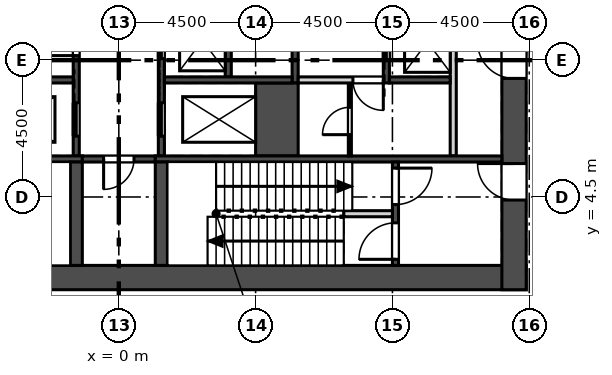
"""IFC4 building model, lengths in metres.
Left out: names, types, materials, properties, quantities, classifications, styles, units other than length and angle.
Written with IfcOpenShell. Run it as: python <this file> out.ifc"""

import sys

from ifc_helpers import new_model, si_unit, direction, frame, frame_2d, origin, place, context, subcontext, project, spatial, rectangle, extrude, element, fill, save


model = new_model("IFC4")
c1 = context("Model", 3, precision=1e-05, world=origin(), true_north=direction((0.0, 1.0)))
c2 = subcontext(c1, "Body", "Model", "MODEL_VIEW")
j1 = project(units=[si_unit("LENGTHUNIT", "METRE"), si_unit("PLANEANGLEUNIT", "RADIAN")], contexts=[c1])
p1 = place(None, origin())
s1 = spatial("IfcSite", under=j1, at=p1, CompositionType="ELEMENT")
p2 = place(p1, origin())
s2 = spatial("IfcBuilding", under=s1, at=p2, CompositionType="ELEMENT")
p3 = place(p2, frame((0.0, 0.0, 304.5)))
s3 = spatial("IfcBuildingStorey", under=s2, at=p3, CompositionType="ELEMENT", Elevation=304.5)
p4 = place(p3, frame((-13.4, 1.85, 0.0), z_axis=(0.0, 0.0, 1.0), x_axis=(1.0, 0.0, 0.0)))
e1 = element("IfcWall", 1, at=p4, inside=s3, PredefinedType="SHEAR", context=c2, shape_type="SweptSolid", body=[
    extrude(rectangle(XDim=26.8, YDim=0.8, at=frame_2d((13.4, 0.0))), origin(), (0.0, 0.0, 1.0), 5.4),
])
p5 = place(p3, frame((13.0, 1.45, 0.0), z_axis=(0.0, 0.0, 1.0), x_axis=(0.0, 1.0, 0.0)))
e2 = element("IfcWall", 2, at=p5, inside=s3, PredefinedType="SHEAR", context=c2, shape_type="SweptSolid", body=[
    extrude(rectangle(XDim=9.442, YDim=0.8, at=frame_2d((4.721, 0.0))), origin(), (0.0, 0.0, 1.0), 5.4),
])
p6 = place(p5, frame((2.95, 0.0, 0.0)))
e3 = element("IfcOpeningElement", 3, at=p6, cuts=e2, PredefinedType="OPENING", context=c2, shape_type="SweptSolid", body=[
    extrude(rectangle(XDim=1.2, YDim=2.1, at=frame_2d((0.6, 1.05))), frame((0.0, 0.41, 0.0), z_axis=(0.0, -1.0, 0.0), x_axis=(1.0, 0.0, 0.0)), (0.0, 0.0, 1.0), 0.82),
])
p7 = place(p5, frame((6.95, 0.0, 0.0)))
e4 = element("IfcOpeningElement", 4, at=p7, cuts=e2, PredefinedType="OPENING", context=c2, shape_type="SweptSolid", body=[
    extrude(rectangle(XDim=1.2, YDim=2.1, at=frame_2d((0.6, 1.05))), frame((0.0, 0.41, 0.0), z_axis=(0.0, -1.0, 0.0), x_axis=(1.0, 0.0, 0.0)), (0.0, 0.0, 1.0), 0.82),
])
p8 = place(p3, frame((24.905, 7.709, 0.0), z_axis=(0.0, 0.0, 1.0), x_axis=(-0.50000128873, 0.866024659735, 0.0)))
e5 = element("IfcWall", 5, at=p8, inside=s3, PredefinedType="SOLIDWALL", context=c2, shape_type="SweptSolid", body=[
    extrude(rectangle(XDim=41.104, YDim=0.34, at=frame_2d((20.552, 0.0))), origin(), (0.0, 0.0, 1.0), 5.0),
])
p9 = place(p8, frame((3.776, 0.0, 0.9)))
e6 = element("IfcOpeningElement", 6, at=p9, cuts=e5, PredefinedType="OPENING", context=c2, shape_type="SweptSolid", body=[
    extrude(rectangle(XDim=1.885, YDim=3.0, at=frame_2d((0.942, 1.5))), frame((0.0, 0.18, 0.0), z_axis=(0.0, -1.0, 0.0), x_axis=(1.0, 0.0, 0.0)), (0.0, 0.0, 1.0), 0.36),
])
p10 = place(p8, frame((6.776, 0.0, 0.9)))
e7 = element("IfcOpeningElement", 7, at=p10, cuts=e5, PredefinedType="OPENING", context=c2, shape_type="SweptSolid", body=[
    extrude(rectangle(XDim=1.885, YDim=3.0, at=frame_2d((0.942, 1.5))), frame((0.0, 0.18, 0.0), z_axis=(0.0, -1.0, 0.0), x_axis=(1.0, 0.0, 0.0)), (0.0, 0.0, 1.0), 0.36),
])
p11 = place(p8, frame((9.776, 0.0, 0.9)))
e8 = element("IfcOpeningElement", 8, at=p11, cuts=e5, PredefinedType="OPENING", context=c2, shape_type="SweptSolid", body=[
    extrude(rectangle(XDim=1.885, YDim=3.0, at=frame_2d((0.942, 1.5))), frame((0.0, 0.18, 0.0), z_axis=(0.0, -1.0, 0.0), x_axis=(1.0, 0.0, 0.0)), (0.0, 0.0, 1.0), 0.36),
])
p12 = place(p8, frame((12.776, 0.0, 0.9)))
e9 = element("IfcOpeningElement", 9, at=p12, cuts=e5, PredefinedType="OPENING", context=c2, shape_type="SweptSolid", body=[
    extrude(rectangle(XDim=1.885, YDim=3.0, at=frame_2d((0.942, 1.5))), frame((0.0, 0.18, 0.0), z_axis=(0.0, -1.0, 0.0), x_axis=(1.0, 0.0, 0.0)), (0.0, 0.0, 1.0), 0.36),
])
p13 = place(p8, frame((15.776, 0.0, 0.9)))
e10 = element("IfcOpeningElement", 10, at=p13, cuts=e5, PredefinedType="OPENING", context=c2, shape_type="SweptSolid", body=[
    extrude(rectangle(XDim=1.885, YDim=3.0, at=frame_2d((0.942, 1.5))), frame((0.0, 0.18, 0.0), z_axis=(0.0, -1.0, 0.0), x_axis=(1.0, 0.0, 0.0)), (0.0, 0.0, 1.0), 0.36),
])
p14 = place(p8, frame((18.776, 0.0, 0.9)))
e11 = element("IfcOpeningElement", 11, at=p14, cuts=e5, PredefinedType="OPENING", context=c2, shape_type="SweptSolid", body=[
    extrude(rectangle(XDim=1.885, YDim=3.0, at=frame_2d((0.942, 1.5))), frame((0.0, 0.18, 0.0), z_axis=(0.0, -1.0, 0.0), x_axis=(1.0, 0.0, 0.0)), (0.0, 0.0, 1.0), 0.36),
])
p15 = place(p8, frame((21.776, 0.0, 0.9)))
e12 = element("IfcOpeningElement", 12, at=p15, cuts=e5, PredefinedType="OPENING", context=c2, shape_type="SweptSolid", body=[
    extrude(rectangle(XDim=1.885, YDim=3.0, at=frame_2d((0.942, 1.5))), frame((0.0, 0.18, 0.0), z_axis=(0.0, -1.0, 0.0), x_axis=(1.0, 0.0, 0.0)), (0.0, 0.0, 1.0), 0.36),
])
p16 = place(p8, frame((24.776, 0.0, 0.9)))
e13 = element("IfcOpeningElement", 13, at=p16, cuts=e5, PredefinedType="OPENING", context=c2, shape_type="SweptSolid", body=[
    extrude(rectangle(XDim=1.885, YDim=3.0, at=frame_2d((0.942, 1.5))), frame((0.0, 0.18, 0.0), z_axis=(0.0, -1.0, 0.0), x_axis=(1.0, 0.0, 0.0)), (0.0, 0.0, 1.0), 0.36),
])
p17 = place(p8, frame((27.776, 0.0, 0.9)))
e14 = element("IfcOpeningElement", 14, at=p17, cuts=e5, PredefinedType="OPENING", context=c2, shape_type="SweptSolid", body=[
    extrude(rectangle(XDim=1.885, YDim=3.0, at=frame_2d((0.942, 1.5))), frame((0.0, 0.18, 0.0), z_axis=(0.0, -1.0, 0.0), x_axis=(1.0, 0.0, 0.0)), (0.0, 0.0, 1.0), 0.36),
])
p18 = place(p8, frame((30.776, 0.0, 0.9)))
e15 = element("IfcOpeningElement", 15, at=p18, cuts=e5, PredefinedType="OPENING", context=c2, shape_type="SweptSolid", body=[
    extrude(rectangle(XDim=1.885, YDim=3.0, at=frame_2d((0.942, 1.5))), frame((0.0, 0.18, 0.0), z_axis=(0.0, -1.0, 0.0), x_axis=(1.0, 0.0, 0.0)), (0.0, 0.0, 1.0), 0.36),
])
p19 = place(p8, frame((33.776, 0.0, 0.9)))
e16 = element("IfcOpeningElement", 16, at=p19, cuts=e5, PredefinedType="OPENING", context=c2, shape_type="SweptSolid", body=[
    extrude(rectangle(XDim=1.885, YDim=3.0, at=frame_2d((0.942, 1.5))), frame((0.0, 0.18, 0.0), z_axis=(0.0, -1.0, 0.0), x_axis=(1.0, 0.0, 0.0)), (0.0, 0.0, 1.0), 0.36),
])
p20 = place(p8, frame((36.776, 0.0, 0.9)))
e17 = element("IfcOpeningElement", 17, at=p20, cuts=e5, PredefinedType="OPENING", context=c2, shape_type="SweptSolid", body=[
    extrude(rectangle(XDim=1.885, YDim=3.0, at=frame_2d((0.942, 1.5))), frame((0.0, 0.18, 0.0), z_axis=(0.0, -1.0, 0.0), x_axis=(1.0, 0.0, 0.0)), (0.0, 0.0, 1.0), 0.36),
])
p21 = place(p3, frame((11.0, 5.85, 0.0), z_axis=(0.0, 0.0, 1.0), x_axis=(0.0, 1.0, 0.0)))
e18 = element("IfcWall", 18, at=p21, inside=s3, PredefinedType="SOLIDWALL", context=c2, shape_type="SweptSolid", body=[
    extrude(rectangle(XDim=7.4, YDim=0.2, at=frame_2d((3.7, 0.0))), origin(), (0.0, 0.0, 1.0), 5.0),
])
p22 = place(p3, frame((8.8, 8.25, -0.4), z_axis=(0.0, 0.0, 1.0), x_axis=(0.0, 1.0, 0.0)))
e19 = element("IfcWall", 19, at=p22, inside=s3, PredefinedType="SOLIDWALL", context=c2, shape_type="SweptSolid", body=[
    extrude(rectangle(XDim=5.2, YDim=0.2, at=frame_2d((2.6, 0.0))), origin(), (0.0, 0.0, 1.0), 5.4),
])
p23 = place(p22, frame((0.75, 0.0, 0.4)))
e20 = element("IfcOpeningElement", 20, at=p23, cuts=e19, PredefinedType="OPENING", context=c2, shape_type="SweptSolid", body=[
    extrude(rectangle(XDim=1.2, YDim=2.1, at=frame_2d((0.6, 1.05))), frame((0.0, 0.11, 0.0), z_axis=(0.0, -1.0, 0.0), x_axis=(1.0, 0.0, 0.0)), (0.0, 0.0, 1.0), 0.22),
])
p24 = place(p22, frame((3.25, 0.0, 0.4)))
e21 = element("IfcOpeningElement", 21, at=p24, cuts=e19, PredefinedType="OPENING", context=c2, shape_type="SweptSolid", body=[
    extrude(rectangle(XDim=1.2, YDim=2.1, at=frame_2d((0.6, 1.05))), frame((0.0, 0.11, 0.0), z_axis=(0.0, -1.0, 0.0), x_axis=(1.0, 0.0, 0.0)), (0.0, 0.0, 1.0), 0.22),
])
p25 = place(p3, frame((5.8, 8.25, -0.4), z_axis=(0.0, 0.0, 1.0), x_axis=(0.0, 1.0, 0.0)))
e22 = element("IfcWall", 22, at=p25, inside=s3, PredefinedType="SOLIDWALL", context=c2, shape_type="SweptSolid", body=[
    extrude(rectangle(XDim=8.0, YDim=0.2, at=frame_2d((4.0, 0.0))), origin(), (0.0, 0.0, 1.0), 5.4),
])
p26 = place(p25, frame((3.5, 0.0, 0.4)))
e23 = element("IfcOpeningElement", 23, at=p26, cuts=e22, PredefinedType="OPENING", context=c2, shape_type="SweptSolid", body=[
    extrude(rectangle(XDim=1.0, YDim=2.1, at=frame_2d((0.5, 1.05))), frame((0.0, 0.11, 0.0), z_axis=(0.0, -1.0, 0.0), x_axis=(1.0, 0.0, 0.0)), (0.0, 0.0, 1.0), 0.22),
])
p27 = place(p3, frame((3.6, 8.45, -0.4), z_axis=(0.0, 0.0, 1.0), x_axis=(0.0, 1.0, 0.0)))
e24 = element("IfcWall", 24, at=p27, inside=s3, PredefinedType="SOLIDWALL", context=c2, shape_type="SweptSolid", body=[
    extrude(rectangle(XDim=7.8, YDim=0.2, at=frame_2d((3.9, 0.0))), origin(), (0.0, 0.0, 1.0), 5.4),
])
p28 = place(p3, frame((-1.4, 5.85, -0.4), z_axis=(0.0, 0.0, 1.0), x_axis=(0.0, 1.0, 0.0)))
e25 = element("IfcWall", 25, at=p28, inside=s3, PredefinedType="SOLIDWALL", context=c2, shape_type="SweptSolid", body=[
    extrude(rectangle(XDim=11.75, YDim=0.2, at=frame_2d((5.875, 0.0))), origin(), (0.0, 0.0, 1.0), 5.4),
])
p29 = place(p28, frame((0.65, 0.0, 0.4)))
e26 = element("IfcOpeningElement", 26, at=p29, cuts=e25, PredefinedType="OPENING", context=c2, shape_type="SweptSolid", body=[
    extrude(rectangle(XDim=1.1, YDim=2.1, at=frame_2d((0.55, 1.05))), frame((0.0, 0.11, 0.0), z_axis=(0.0, -1.0, 0.0), x_axis=(1.0, 0.0, 0.0)), (0.0, 0.0, 1.0), 0.22),
])
p30 = place(p28, frame((3.3, 0.0, 0.4)))
e27 = element("IfcOpeningElement", 27, at=p30, cuts=e25, PredefinedType="OPENING", context=c2, shape_type="SweptSolid", body=[
    extrude(rectangle(XDim=1.0, YDim=2.1, at=frame_2d((0.5, 1.05))), frame((0.0, 0.11, 0.0), z_axis=(0.0, -1.0, 0.0), x_axis=(1.0, 0.0, 0.0)), (0.0, 0.0, 1.0), 0.22),
])
p31 = place(p28, frame((7.2, 0.0, 0.4)))
e28 = element("IfcOpeningElement", 28, at=p31, cuts=e25, PredefinedType="OPENING", context=c2, shape_type="SweptSolid", body=[
    extrude(rectangle(XDim=1.0, YDim=2.1, at=frame_2d((0.5, 1.05))), frame((0.0, 0.11, 0.0), z_axis=(0.0, -1.0, 0.0), x_axis=(1.0, 0.0, 0.0)), (0.0, 0.0, 1.0), 0.22),
])
p32 = place(p3, frame((1.4, 5.85, -0.4), z_axis=(0.0, 0.0, 1.0), x_axis=(0.0, 1.0, 0.0)))
e29 = element("IfcWall", 29, at=p32, inside=s3, PredefinedType="SOLIDWALL", context=c2, shape_type="SweptSolid", body=[
    extrude(rectangle(XDim=11.75, YDim=0.2, at=frame_2d((5.875, 0.0))), origin(), (0.0, 0.0, 1.0), 5.4),
])
p33 = place(p32, frame((3.2, 0.0, 0.4)))
e30 = element("IfcOpeningElement", 30, at=p33, cuts=e29, PredefinedType="OPENING", context=c2, shape_type="SweptSolid", body=[
    extrude(rectangle(XDim=1.2, YDim=2.1, at=frame_2d((0.6, 1.05))), frame((0.0, 0.11, 0.0), z_axis=(0.0, -1.0, 0.0), x_axis=(1.0, 0.0, 0.0)), (0.0, 0.0, 1.0), 0.22),
])
p34 = place(p32, frame((0.65, 0.0, 0.4)))
e31 = element("IfcOpeningElement", 31, at=p34, cuts=e29, PredefinedType="OPENING", context=c2, shape_type="SweptSolid", body=[
    extrude(rectangle(XDim=1.1, YDim=2.1, at=frame_2d((0.55, 1.05))), frame((0.0, 0.11, 0.0), z_axis=(0.0, -1.0, 0.0), x_axis=(1.0, 0.0, 0.0)), (0.0, 0.0, 1.0), 0.22),
])
p35 = place(p32, frame((5.9, 0.0, 0.4)))
e32 = element("IfcOpeningElement", 32, at=p35, cuts=e29, PredefinedType="OPENING", context=c2, shape_type="SweptSolid", body=[
    extrude(rectangle(XDim=1.0, YDim=2.1, at=frame_2d((0.5, 1.05))), frame((0.0, 0.11, 0.0), z_axis=(0.0, -1.0, 0.0), x_axis=(1.0, 0.0, 0.0)), (0.0, 0.0, 1.0), 0.22),
])
p36 = place(p3, frame((5.2, 5.85, -0.4), z_axis=(0.0, 0.0, 1.0), x_axis=(0.0, 1.0, 0.0)))
e33 = element("IfcWall", 33, at=p36, inside=s3, PredefinedType="SOLIDWALL", context=c2, shape_type="SweptSolid", body=[
    extrude(rectangle(XDim=2.4, YDim=1.4, at=frame_2d((1.2, 0.0))), origin(), (0.0, 0.0, 1.0), 5.4),
])
p37 = place(p3, frame((8.9, 8.35, -0.4), z_axis=(0.0, 0.0, 1.0), x_axis=(1.0, 0.0, 0.0)))
e34 = element("IfcWall", 34, at=p37, inside=s3, PredefinedType="SOLIDWALL", context=c2, shape_type="SweptSolid", body=[
    extrude(rectangle(XDim=2.0, YDim=0.2, at=frame_2d((1.0, 0.0))), origin(), (0.0, 0.0, 1.0), 5.4),
])
for number, where, z_axis, x_axis in (
    (35, (-5.7, 8.35, -0.4), (0.0, 0.0, 1.0), (1.0, 0.0, 0.0)),
    (36, (1.5, 8.35, -0.4), (0.0, 0.0, 1.0), (1.0, 0.0, 0.0)),
):
    element("IfcWall", number, at=place(p3, frame(where, z_axis=z_axis, x_axis=x_axis)), inside=s3, PredefinedType="SOLIDWALL", context=c2, shape_type="SweptSolid", body=[
        extrude(rectangle(XDim=4.2, YDim=0.2, at=frame_2d((2.1, 0.0))), origin(), (0.0, 0.0, 1.0), 5.4),
    ])
p38 = place(p3, frame((-12.6, 5.75, -0.4), z_axis=(0.0, 0.0, 1.0), x_axis=(1.0, 0.0, 0.0)))
e37 = element("IfcWall", 37, at=p38, inside=s3, PredefinedType="SOLIDWALL", context=c2, shape_type="SweptSolid", body=[
    extrude(rectangle(XDim=11.4, YDim=0.2, at=frame_2d((5.7, 0.0))), origin(), (0.0, 0.0, 1.0), 5.4),
])
p39 = place(p3, frame((-1.2, 5.75, -0.4), z_axis=(0.0, 0.0, 1.0), x_axis=(1.0, 0.0, 0.0)))
e38 = element("IfcWall", 38, at=p39, inside=s3, PredefinedType="SOLIDWALL", context=c2, shape_type="SweptSolid", body=[
    extrude(rectangle(XDim=2.4, YDim=0.2, at=frame_2d((1.2, 0.0))), origin(), (0.0, 0.0, 1.0), 5.4),
])
p40 = place(p39, frame((0.7, 0.0, 0.4)))
e39 = element("IfcOpeningElement", 39, at=p40, cuts=e38, PredefinedType="OPENING", context=c2, shape_type="SweptSolid", body=[
    extrude(rectangle(XDim=1.0, YDim=2.1, at=frame_2d((0.5, 1.05))), frame((0.0, 0.11, 0.0), z_axis=(0.0, -1.0, 0.0), x_axis=(1.0, 0.0, 0.0)), (0.0, 0.0, 1.0), 0.22),
])
p41 = place(p3, frame((1.2, 5.75, -0.4), z_axis=(0.0, 0.0, 1.0), x_axis=(1.0, 0.0, 0.0)))
e40 = element("IfcWall", 40, at=p41, inside=s3, PredefinedType="SOLIDWALL", context=c2, shape_type="SweptSolid", body=[
    extrude(rectangle(XDim=11.4, YDim=0.2, at=frame_2d((5.7, 0.0))), origin(), (0.0, 0.0, 1.0), 5.4),
])
p42 = place(p3, frame((9.1, 2.25, -0.4), z_axis=(0.0, 0.0, 1.0), x_axis=(0.0, 1.0, 0.0)))
e41 = element("IfcWall", 41, at=p42, inside=s3, PredefinedType="SOLIDWALL", context=c2, shape_type="SweptSolid", body=[
    extrude(rectangle(XDim=3.4, YDim=0.2, at=frame_2d((1.7, 0.0))), origin(), (0.0, 0.0, 1.0), 5.4),
])
p43 = place(p42, frame((0.2, 0.0, 0.4)))
e42 = element("IfcOpeningElement", 42, at=p43, cuts=e41, PredefinedType="OPENING", context=c2, shape_type="SweptSolid", body=[
    extrude(rectangle(XDim=1.2, YDim=2.1, at=frame_2d((0.6, 1.05))), frame((0.0, 0.11, 0.0), z_axis=(0.0, -1.0, 0.0), x_axis=(1.0, 0.0, 0.0)), (0.0, 0.0, 1.0), 0.22),
])
p44 = place(p42, frame((2.0, 0.0, 0.4)))
e43 = element("IfcOpeningElement", 43, at=p44, cuts=e41, PredefinedType="OPENING", context=c2, shape_type="SweptSolid", body=[
    extrude(rectangle(XDim=1.2, YDim=2.1, at=frame_2d((0.6, 1.05))), frame((0.0, 0.11, 0.0), z_axis=(0.0, -1.0, 0.0), x_axis=(1.0, 0.0, 0.0)), (0.0, 0.0, 1.0), 0.22),
])
for number, where, z_axis, x_axis in (
    (44, (-1.4, 2.25, -0.4), (0.0, 0.0, 1.0), (0.0, 1.0, 0.0)),
    (45, (1.4, 2.25, -0.4), (0.0, 0.0, 1.0), (0.0, 1.0, 0.0)),
):
    element("IfcWall", number, at=place(p3, frame(where, z_axis=z_axis, x_axis=x_axis)), inside=s3, PredefinedType="SOLIDWALL", context=c2, shape_type="SweptSolid", body=[
        extrude(rectangle(XDim=3.4, YDim=0.4, at=frame_2d((1.7, 0.0))), origin(), (0.0, 0.0, 1.0), 5.4),
    ])
p45 = place(p3, frame((7.6, 5.85, 0.0), z_axis=(0.0, 0.0, 1.0), x_axis=(0.0, 1.0, 0.0)))
e46 = element("IfcWall", 46, at=p45, inside=s3, PredefinedType="PARTITIONING", context=c2, shape_type="SweptSolid", body=[
    extrude(rectangle(XDim=2.4, YDim=0.1, at=frame_2d((1.2, 0.0))), origin(), (0.0, 0.0, 1.0), 5.0),
])
p46 = place(p45, frame((0.7, 0.0, 0.0)))
e47 = element("IfcOpeningElement", 47, at=p46, cuts=e46, PredefinedType="OPENING", context=c2, shape_type="SweptSolid", body=[
    extrude(rectangle(XDim=0.9, YDim=2.1, at=frame_2d((0.45, 1.05))), frame((0.0, 0.06, 0.0), z_axis=(0.0, -1.0, 0.0), x_axis=(1.0, 0.0, 0.0)), (0.0, 0.0, 1.0), 0.12),
])
p47 = place(p3, frame((5.9, 8.35, 0.0), z_axis=(0.0, 0.0, 1.0), x_axis=(1.0, 0.0, 0.0)))
e48 = element("IfcWall", 48, at=p47, inside=s3, PredefinedType="SOLIDWALL", context=c2, shape_type="SweptSolid", body=[
    extrude(rectangle(XDim=2.8, YDim=0.2, at=frame_2d((1.4, 0.0))), origin(), (0.0, 0.0, 1.0), 5.0),
])
p48 = place(p47, frame((1.8, 0.0, 0.0)))
e49 = element("IfcOpeningElement", 49, at=p48, cuts=e48, PredefinedType="OPENING", context=c2, shape_type="SweptSolid", body=[
    extrude(rectangle(XDim=1.0, YDim=2.1, at=frame_2d((0.5, 1.05))), frame((0.0, 0.11, 0.0), z_axis=(0.0, -1.0, 0.0), x_axis=(1.0, 0.0, 0.0)), (0.0, 0.0, 1.0), 0.22),
])
p49 = place(p3, frame((7.4, 3.95, 0.0), z_axis=(0.0, 0.0, 1.0), x_axis=(1.0, 0.0, 0.0)))
e50 = element("IfcWall", 50, at=p49, inside=s3, PredefinedType="SOLIDWALL", context=c2, shape_type="SweptSolid", body=[
    extrude(rectangle(XDim=1.6, YDim=0.2, at=frame_2d((0.8, 0.0))), origin(), (0.0, 0.0, 1.0), 5.0),
])
p50 = place(p29, origin())
e51 = element("IfcDoor", 51, at=p50, inside=s3, OperationType="SLIDING_TO_RIGHT", PredefinedType="DOOR", context=c2, shape_type="SweptSolid", body=[
    extrude(rectangle(XDim=1.1, YDim=2.1, at=frame_2d((0.55, 1.05))), frame((0.0, 0.025, 0.0), z_axis=(0.0, -1.0, 0.0), x_axis=(1.0, 0.0, 0.0)), (0.0, 0.0, 1.0), 0.05),
])
fill(e26, e51)
p51 = place(p23, origin())
e52 = element("IfcDoor", 52, at=p51, inside=s3, OperationType="SLIDING_TO_LEFT", PredefinedType="DOOR", context=c2, shape_type="SweptSolid", body=[
    extrude(rectangle(XDim=1.2, YDim=2.1, at=frame_2d((0.6, 1.05))), frame((0.0, 0.025, 0.0), z_axis=(0.0, -1.0, 0.0), x_axis=(1.0, 0.0, 0.0)), (0.0, 0.0, 1.0), 0.05),
])
fill(e20, e52)
p52 = place(p33, origin())
e53 = element("IfcDoor", 53, at=p52, inside=s3, OperationType="SLIDING_TO_LEFT", PredefinedType="DOOR", context=c2, shape_type="SweptSolid", body=[
    extrude(rectangle(XDim=1.2, YDim=2.1, at=frame_2d((0.6, 1.05))), frame((0.0, 0.025, 0.0), z_axis=(0.0, -1.0, 0.0), x_axis=(1.0, 0.0, 0.0)), (0.0, 0.0, 1.0), 0.05),
])
fill(e30, e53)
p53 = place(p34, origin())
e54 = element("IfcDoor", 54, at=p53, inside=s3, OperationType="SLIDING_TO_RIGHT", PredefinedType="DOOR", context=c2, shape_type="SweptSolid", body=[
    extrude(rectangle(XDim=1.1, YDim=2.1, at=frame_2d((0.55, 1.05))), frame((0.0, 0.025, 0.0), z_axis=(0.0, -1.0, 0.0), x_axis=(1.0, 0.0, 0.0)), (0.0, 0.0, 1.0), 0.05),
])
fill(e31, e54)
p54 = place(p30, origin())
e55 = element("IfcDoor", 55, at=p54, inside=s3, OperationType="SINGLE_SWING_LEFT", PredefinedType="DOOR", context=c2, shape_type="SweptSolid", body=[
    extrude(rectangle(XDim=1.0, YDim=2.1, at=frame_2d((0.5, 1.05))), frame((0.0, 0.025, 0.0), z_axis=(0.0, -1.0, 0.0), x_axis=(1.0, 0.0, 0.0)), (0.0, 0.0, 1.0), 0.05),
])
fill(e27, e55)
p55 = place(p40, frame((1.0, 0.0, 0.0), z_axis=(0.0, 0.0, 1.0), x_axis=(-1.0, 0.0, 0.0)))
e56 = element("IfcDoor", 56, at=p55, inside=s3, OperationType="SINGLE_SWING_RIGHT", PredefinedType="DOOR", context=c2, shape_type="SweptSolid", body=[
    extrude(rectangle(XDim=1.0, YDim=2.1, at=frame_2d((0.5, 1.05))), frame((0.0, 0.025, 0.0), z_axis=(0.0, -1.0, 0.0), x_axis=(1.0, 0.0, 0.0)), (0.0, 0.0, 1.0), 0.05),
])
fill(e39, e56)
p56 = place(p48, frame((1.0, 0.0, 0.0), z_axis=(0.0, 0.0, 1.0), x_axis=(-1.0, 0.0, 0.0)))
e57 = element("IfcDoor", 57, at=p56, inside=s3, OperationType="SINGLE_SWING_LEFT", PredefinedType="DOOR", context=c2, shape_type="SweptSolid", body=[
    extrude(rectangle(XDim=1.0, YDim=2.1, at=frame_2d((0.5, 1.05))), frame((0.0, 0.025, 0.0), z_axis=(0.0, -1.0, 0.0), x_axis=(1.0, 0.0, 0.0)), (0.0, 0.0, 1.0), 0.05),
])
fill(e49, e57)
p57 = place(p46, origin())
e58 = element("IfcDoor", 58, at=p57, inside=s3, OperationType="SINGLE_SWING_LEFT", PredefinedType="DOOR", context=c2, shape_type="SweptSolid", body=[
    extrude(rectangle(XDim=0.9, YDim=2.1, at=frame_2d((0.45, 1.05))), frame((0.0, 0.025, 0.0), z_axis=(0.0, -1.0, 0.0), x_axis=(1.0, 0.0, 0.0)), (0.0, 0.0, 1.0), 0.05),
])
fill(e47, e58)
p58 = place(p6, origin())
e59 = element("IfcDoor", 59, at=p58, inside=s3, OperationType="SINGLE_SWING_RIGHT", PredefinedType="DOOR", context=c2, shape_type="SweptSolid", body=[
    extrude(rectangle(XDim=1.2, YDim=2.1, at=frame_2d((0.6, 1.05))), frame((0.0, 0.025, 0.0), z_axis=(0.0, -1.0, 0.0), x_axis=(1.0, 0.0, 0.0)), (0.0, 0.0, 1.0), 0.05),
])
fill(e3, e59)
p59 = place(p43, origin())
e60 = element("IfcDoor", 60, at=p59, inside=s3, OperationType="SINGLE_SWING_LEFT", PredefinedType="DOOR", context=c2, shape_type="SweptSolid", body=[
    extrude(rectangle(XDim=1.2, YDim=2.1, at=frame_2d((0.6, 1.05))), frame((0.0, 0.025, 0.0), z_axis=(0.0, -1.0, 0.0), x_axis=(1.0, 0.0, 0.0)), (0.0, 0.0, 1.0), 0.05),
])
fill(e42, e60)
p60 = place(p7, origin())
e61 = element("IfcDoor", 61, at=p60, inside=s3, OperationType="SINGLE_SWING_RIGHT", PredefinedType="DOOR", context=c2, shape_type="SweptSolid", body=[
    extrude(rectangle(XDim=1.2, YDim=2.1, at=frame_2d((0.6, 1.05))), frame((0.0, 0.025, 0.0), z_axis=(0.0, -1.0, 0.0), x_axis=(1.0, 0.0, 0.0)), (0.0, 0.0, 1.0), 0.05),
])
fill(e4, e61)
p61 = place(p44, frame((1.2, 0.0, 0.0), z_axis=(0.0, 0.0, 1.0), x_axis=(-1.0, 0.0, 0.0)))
e62 = element("IfcDoor", 62, at=p61, inside=s3, OperationType="SINGLE_SWING_LEFT", PredefinedType="DOOR", context=c2, shape_type="SweptSolid", body=[
    extrude(rectangle(XDim=1.2, YDim=2.1, at=frame_2d((0.6, 1.05))), frame((0.0, 0.025, 0.0), z_axis=(0.0, -1.0, 0.0), x_axis=(1.0, 0.0, 0.0)), (0.0, 0.0, 1.0), 0.05),
])
fill(e43, e62)
save(model, sys.argv[1])
